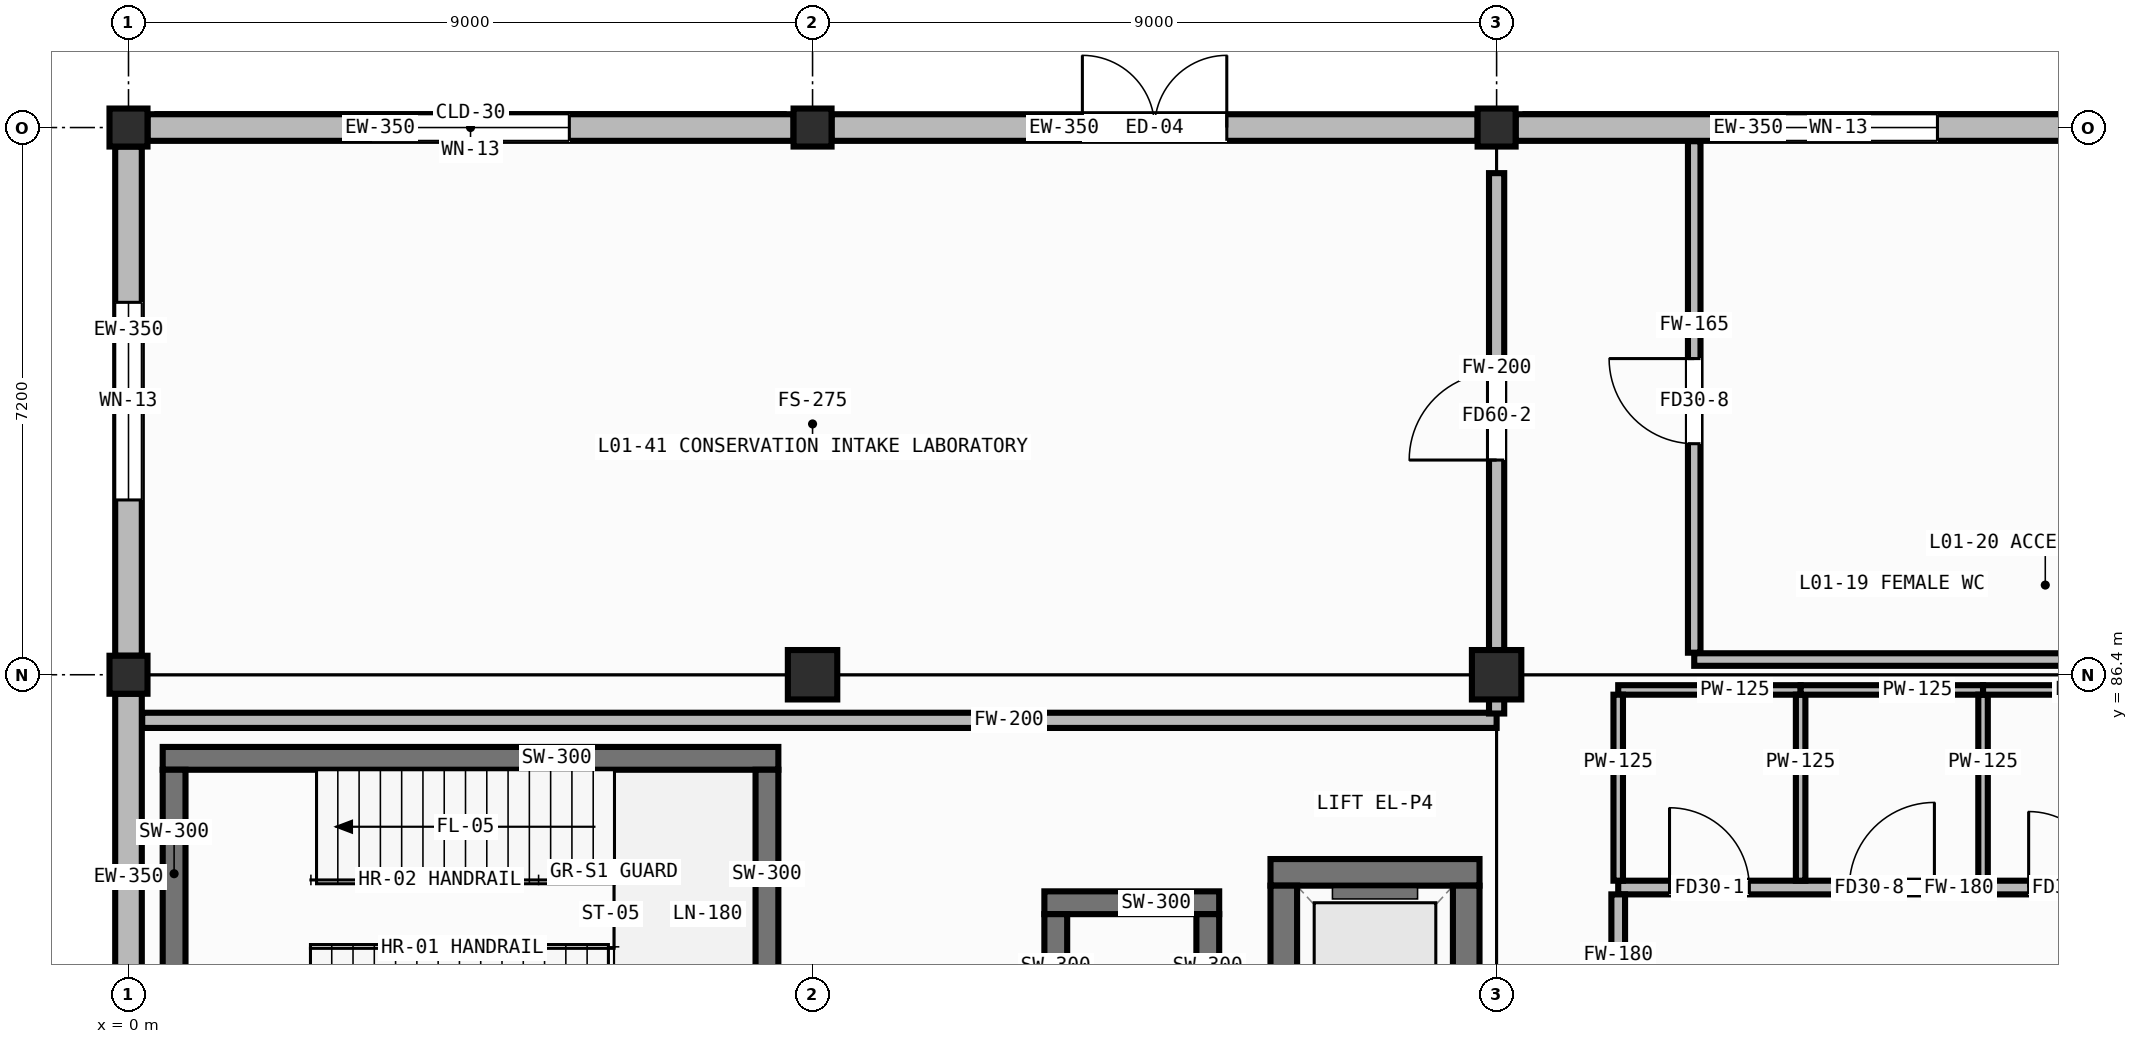
"""IFC4 building model, lengths in metres.
Left out: names, types, materials, properties, quantities, classifications, styles, units other than length and angle.
Written with IfcOpenShell. Run it as: python <this file> out.ifc"""

import sys

from ifc_helpers import new_model, si_unit, direction, frame, frame_2d, origin, origin_2d, place, context, subcontext, project, spatial, rectangle, hollow_rectangle, extrude, element, fill, save


model = new_model("IFC4")
c1 = context("Model", 3, precision=1e-05, world=origin(), true_north=direction((0.0, 1.0)))
c2 = subcontext(c1, "Body", "Model", "MODEL_VIEW")
j1 = project(units=[si_unit("LENGTHUNIT", "METRE"), si_unit("PLANEANGLEUNIT", "RADIAN")], contexts=[c1])
p1 = place(None, origin())
s1 = spatial("IfcSite", under=j1, at=p1, CompositionType="ELEMENT")
p2 = place(p1, origin())
s2 = spatial("IfcBuilding", under=s1, at=p2, CompositionType="ELEMENT")
p3 = place(p2, origin())
s3 = spatial("IfcBuildingStorey", under=s2, at=p3, CompositionType="ELEMENT", Elevation=0.0)
for number, where, z_axis, x_axis in (
    (1, (0.0, 86.4, 0.0), (0.0, 0.0, 1.0), (1.0, 0.0, 0.0)),
    (2, (0.0, 93.6, 0.0), (0.0, 0.0, 1.0), (1.0, 0.0, 0.0)),
):
    element("IfcColumn", number, at=place(p3, frame(where, z_axis=z_axis, x_axis=x_axis)), inside=s3, PredefinedType="COLUMN", context=c2, shape_type="SweptSolid", body=[
        extrude(hollow_rectangle(XDim=0.5, YDim=0.5, WallThickness=0.022, at=origin_2d()), origin(), (0.0, 0.0, 1.0), 4.8),
    ])
p4 = place(p3, frame((9.0, 86.4, 0.0), z_axis=(0.0, 0.0, 1.0), x_axis=(1.0, 0.0, 0.0)))
e3 = element("IfcColumn", 3, at=p4, inside=s3, PredefinedType="COLUMN", context=c2, shape_type="SweptSolid", body=[
    extrude(hollow_rectangle(XDim=0.65, YDim=0.65, WallThickness=0.025, at=origin_2d()), origin(), (0.0, 0.0, 1.0), 4.8),
])
p5 = place(p3, frame((9.0, 93.6, 0.0), z_axis=(0.0, 0.0, 1.0), x_axis=(1.0, 0.0, 0.0)))
e4 = element("IfcColumn", 4, at=p5, inside=s3, PredefinedType="COLUMN", context=c2, shape_type="SweptSolid", body=[
    extrude(hollow_rectangle(XDim=0.5, YDim=0.5, WallThickness=0.022, at=origin_2d()), origin(), (0.0, 0.0, 1.0), 4.8),
])
p6 = place(p3, frame((18.0, 86.4, 0.0), z_axis=(0.0, 0.0, 1.0), x_axis=(1.0, 0.0, 0.0)))
e5 = element("IfcColumn", 5, at=p6, inside=s3, PredefinedType="COLUMN", context=c2, shape_type="SweptSolid", body=[
    extrude(hollow_rectangle(XDim=0.65, YDim=0.65, WallThickness=0.025, at=origin_2d()), origin(), (0.0, 0.0, 1.0), 4.8),
])
p7 = place(p3, frame((18.0, 93.6, 0.0), z_axis=(0.0, 0.0, 1.0), x_axis=(1.0, 0.0, 0.0)))
e6 = element("IfcColumn", 6, at=p7, inside=s3, PredefinedType="COLUMN", context=c2, shape_type="SweptSolid", body=[
    extrude(hollow_rectangle(XDim=0.5, YDim=0.5, WallThickness=0.022, at=origin_2d()), origin(), (0.0, 0.0, 1.0), 4.8),
])
p8 = place(p3, frame((8.75, 93.6, 0.0), z_axis=(0.0, 0.0, 1.0), x_axis=(-1.0, 0.0, 0.0)))
e7 = element("IfcWall", 7, at=p8, inside=s3, PredefinedType="STANDARD", context=c2, shape_type="SweptSolid", body=[
    extrude(rectangle(XDim=8.5, YDim=0.35, at=frame_2d((4.25, 0.0))), origin(), (0.0, 0.0, 1.0), 4.055),
])
p9 = place(p8, frame((2.95, 0.0, 0.85)))
e8 = element("IfcOpeningElement", 8, at=p9, cuts=e7, PredefinedType="OPENING", context=c2, shape_type="SweptSolid", body=[
    extrude(rectangle(XDim=2.6, YDim=1.6, at=frame_2d((1.3, 0.8))), frame((0.0, 0.187, 0.0), z_axis=(0.0, -1.0, 0.0), x_axis=(1.0, 0.0, 0.0)), (0.0, 0.0, 1.0), 0.374),
])
p10 = place(p3, frame((17.75, 93.6, 0.0), z_axis=(0.0, 0.0, 1.0), x_axis=(-1.0, 0.0, 0.0)))
e9 = element("IfcWall", 9, at=p10, inside=s3, PredefinedType="STANDARD", context=c2, shape_type="SweptSolid", body=[
    extrude(rectangle(XDim=8.5, YDim=0.35, at=frame_2d((4.25, 0.0))), origin(), (0.0, 0.0, 1.0), 4.055),
])
p11 = place(p10, frame((3.3, 0.0, 0.0)))
e10 = element("IfcOpeningElement", 10, at=p11, cuts=e9, PredefinedType="OPENING", context=c2, shape_type="SweptSolid", body=[
    extrude(rectangle(XDim=1.9, YDim=2.4, at=frame_2d((0.95, 1.2))), frame((0.0, 0.187, 0.0), z_axis=(0.0, -1.0, 0.0), x_axis=(1.0, 0.0, 0.0)), (0.0, 0.0, 1.0), 0.374),
])
p12 = place(p3, frame((26.75, 93.6, 0.0), z_axis=(0.0, 0.0, 1.0), x_axis=(-1.0, 0.0, 0.0)))
e11 = element("IfcWall", 11, at=p12, inside=s3, PredefinedType="STANDARD", context=c2, shape_type="SweptSolid", body=[
    extrude(rectangle(XDim=8.5, YDim=0.35, at=frame_2d((4.25, 0.0))), origin(), (0.0, 0.0, 1.0), 4.055),
])
p13 = place(p12, frame((2.95, 0.0, 0.85)))
e12 = element("IfcOpeningElement", 12, at=p13, cuts=e11, PredefinedType="OPENING", context=c2, shape_type="SweptSolid", body=[
    extrude(rectangle(XDim=2.6, YDim=1.6, at=frame_2d((1.3, 0.8))), frame((0.0, 0.187, 0.0), z_axis=(0.0, -1.0, 0.0), x_axis=(1.0, 0.0, 0.0)), (0.0, 0.0, 1.0), 0.374),
])
p14 = place(p3, frame((0.0, 79.45, 0.0), z_axis=(0.0, 0.0, 1.0), x_axis=(0.0, 1.0, 0.0)))
e13 = element("IfcWall", 13, at=p14, inside=s3, PredefinedType="STANDARD", context=c2, shape_type="SweptSolid", body=[
    extrude(rectangle(XDim=6.7, YDim=0.35, at=frame_2d((3.35, 0.0))), origin(), (0.0, 0.0, 1.0), 4.055),
])
p15 = place(p3, frame((0.0, 86.65, 0.0), z_axis=(0.0, 0.0, 1.0), x_axis=(0.0, 1.0, 0.0)))
e14 = element("IfcWall", 14, at=p15, inside=s3, PredefinedType="STANDARD", context=c2, shape_type="SweptSolid", body=[
    extrude(rectangle(XDim=6.7, YDim=0.35, at=frame_2d((3.35, 0.0))), origin(), (0.0, 0.0, 1.0), 4.055),
])
p16 = place(p15, frame((2.05, 0.0, 0.85)))
e15 = element("IfcOpeningElement", 15, at=p16, cuts=e14, PredefinedType="OPENING", context=c2, shape_type="SweptSolid", body=[
    extrude(rectangle(XDim=2.6, YDim=1.6, at=frame_2d((1.3, 0.8))), frame((0.0, 0.187, 0.0), z_axis=(0.0, -1.0, 0.0), x_axis=(1.0, 0.0, 0.0)), (0.0, 0.0, 1.0), 0.374),
])
p17 = place(p3, frame((0.45, 85.3, 0.0), z_axis=(0.0, 0.0, 1.0), x_axis=(1.0, 0.0, 0.0)))
e16 = element("IfcWall", 16, at=p17, inside=s3, PredefinedType="SHEAR", context=c2, shape_type="SweptSolid", body=[
    extrude(rectangle(XDim=8.1, YDim=0.3, at=frame_2d((4.05, 0.0))), origin(), (0.0, 0.0, 1.0), 4.555),
])
for number, where, z_axis, x_axis in (
    (17, (0.6, 81.35, 0.0), (0.0, 0.0, 1.0), (0.0, 1.0, 0.0)),
    (18, (8.4, 81.35, 0.0), (0.0, 0.0, 1.0), (0.0, 1.0, 0.0)),
):
    element("IfcWall", number, at=place(p3, frame(where, z_axis=z_axis, x_axis=x_axis)), inside=s3, PredefinedType="SHEAR", context=c2, shape_type="SweptSolid", body=[
        extrude(rectangle(XDim=3.8, YDim=0.3, at=frame_2d((1.9, 0.0))), origin(), (0.0, 0.0, 1.0), 4.555),
    ])
p18 = place(p3, frame((15.025, 83.8, 0.0), z_axis=(0.0, 0.0, 1.0), x_axis=(1.0, 0.0, 0.0)))
e19 = element("IfcWall", 19, at=p18, inside=s3, PredefinedType="SHEAR", context=c2, shape_type="SweptSolid", body=[
    extrude(rectangle(XDim=2.75, YDim=0.35, at=frame_2d((1.375, 0.0))), origin(), (0.0, 0.0, 1.0), 4.555),
])
for number, where, z_axis, x_axis in (
    (20, (15.2, 81.375, 0.0), (0.0, 0.0, 1.0), (0.0, 1.0, 0.0)),
    (21, (17.6, 81.375, 0.0), (0.0, 0.0, 1.0), (0.0, 1.0, 0.0)),
):
    element("IfcWall", number, at=place(p3, frame(where, z_axis=z_axis, x_axis=x_axis)), inside=s3, PredefinedType="SHEAR", context=c2, shape_type="SweptSolid", body=[
        extrude(rectangle(XDim=2.25, YDim=0.35, at=frame_2d((1.125, 0.0))), origin(), (0.0, 0.0, 1.0), 4.555),
    ])
p19 = place(p3, frame((12.05, 83.4, 0.0), z_axis=(0.0, 0.0, 1.0), x_axis=(1.0, 0.0, 0.0)))
e22 = element("IfcWall", 22, at=p19, inside=s3, PredefinedType="SHEAR", context=c2, shape_type="SweptSolid", body=[
    extrude(rectangle(XDim=2.3, YDim=0.3, at=frame_2d((1.15, 0.0))), origin(), (0.0, 0.0, 1.0), 4.555),
])
for number, where, z_axis, x_axis in (
    (23, (12.2, 81.35, 0.0), (0.0, 0.0, 1.0), (0.0, 1.0, 0.0)),
    (24, (14.2, 81.35, 0.0), (0.0, 0.0, 1.0), (0.0, 1.0, 0.0)),
):
    element("IfcWall", number, at=place(p3, frame(where, z_axis=z_axis, x_axis=x_axis)), inside=s3, PredefinedType="SHEAR", context=c2, shape_type="SweptSolid", body=[
        extrude(rectangle(XDim=1.9, YDim=0.3, at=frame_2d((0.95, 0.0))), origin(), (0.0, 0.0, 1.0), 4.555),
    ])
p20 = place(p3, frame((19.6, 83.6, 0.0), z_axis=(0.0, 0.0, 1.0), x_axis=(1.0, 0.0, 0.0)))
e25 = element("IfcWall", 25, at=p20, inside=s3, PredefinedType="PARTITIONING", context=c2, shape_type="SweptSolid", body=[
    extrude(rectangle(XDim=7.0, YDim=0.18, at=frame_2d((3.5, 0.0))), origin(), (0.0, 0.0, 1.0), 4.555),
])
p21 = place(p20, frame((0.675, 0.0, 0.0)))
e26 = element("IfcOpeningElement", 26, at=p21, cuts=e25, PredefinedType="OPENING", context=c2, shape_type="SweptSolid", body=[
    extrude(rectangle(XDim=1.05, YDim=2.1, at=frame_2d((0.525, 1.05))), frame((0.0, 0.102, 0.0), z_axis=(0.0, -1.0, 0.0), x_axis=(1.0, 0.0, 0.0)), (0.0, 0.0, 1.0), 0.204),
])
p22 = place(p20, frame((3.04, 0.0, 0.0)))
e27 = element("IfcOpeningElement", 27, at=p22, cuts=e25, PredefinedType="OPENING", context=c2, shape_type="SweptSolid", body=[
    extrude(rectangle(XDim=1.12, YDim=2.08, at=frame_2d((0.56, 1.04))), frame((0.0, 0.102, 0.0), z_axis=(0.0, -1.0, 0.0), x_axis=(1.0, 0.0, 0.0)), (0.0, 0.0, 1.0), 0.204),
])
p23 = place(p20, frame((5.4, 0.0, 0.0)))
e28 = element("IfcOpeningElement", 28, at=p23, cuts=e25, PredefinedType="OPENING", context=c2, shape_type="SweptSolid", body=[
    extrude(rectangle(XDim=1.0, YDim=2.08, at=frame_2d((0.5, 1.04))), frame((0.0, 0.102, 0.0), z_axis=(0.0, -1.0, 0.0), x_axis=(1.0, 0.0, 0.0)), (0.0, 0.0, 1.0), 0.204),
])
p24 = place(p3, frame((19.6, 81.29, 0.0), z_axis=(0.0, 0.0, 1.0), x_axis=(0.0, 1.0, 0.0)))
e29 = element("IfcWall", 29, at=p24, inside=s3, PredefinedType="PARTITIONING", context=c2, shape_type="SweptSolid", body=[
    extrude(rectangle(XDim=2.22, YDim=0.18, at=frame_2d((1.11, 0.0))), origin(), (0.0, 0.0, 1.0), 4.555),
])
p25 = place(p3, frame((19.6, 86.2, 0.0), z_axis=(0.0, 0.0, 1.0), x_axis=(1.0, 0.0, 0.0)))
e30 = element("IfcWall", 30, at=p25, inside=s3, PredefinedType="PARTITIONING", context=c2, shape_type="SweptSolid", body=[
    extrude(rectangle(XDim=2.4, YDim=0.125, at=frame_2d((1.2, 0.0))), origin(), (0.0, 0.0, 1.0), 3.835),
])
for number, where, z_axis, x_axis in (
    (31, (19.6, 83.69, 0.0), (0.0, 0.0, 1.0), (0.0, 1.0, 0.0)),
    (32, (22.0, 83.69, 0.0), (0.0, 0.0, 1.0), (0.0, 1.0, 0.0)),
):
    element("IfcWall", number, at=place(p3, frame(where, z_axis=z_axis, x_axis=x_axis)), inside=s3, PredefinedType="PARTITIONING", context=c2, shape_type="SweptSolid", body=[
        extrude(rectangle(XDim=2.448, YDim=0.125, at=frame_2d((1.224, 0.0))), origin(), (0.0, 0.0, 1.0), 4.555),
    ])
p26 = place(p3, frame((22.0, 86.2, 0.0), z_axis=(0.0, 0.0, 1.0), x_axis=(1.0, 0.0, 0.0)))
e33 = element("IfcWall", 33, at=p26, inside=s3, PredefinedType="PARTITIONING", context=c2, shape_type="SweptSolid", body=[
    extrude(rectangle(XDim=2.4, YDim=0.125, at=frame_2d((1.2, 0.0))), origin(), (0.0, 0.0, 1.0), 3.835),
])
p27 = place(p3, frame((24.4, 83.69, 0.0), z_axis=(0.0, 0.0, 1.0), x_axis=(0.0, 1.0, 0.0)))
e34 = element("IfcWall", 34, at=p27, inside=s3, PredefinedType="PARTITIONING", context=c2, shape_type="SweptSolid", body=[
    extrude(rectangle(XDim=2.448, YDim=0.125, at=frame_2d((1.224, 0.0))), origin(), (0.0, 0.0, 1.0), 4.555),
])
p28 = place(p3, frame((24.4, 86.2, 0.0), z_axis=(0.0, 0.0, 1.0), x_axis=(1.0, 0.0, 0.0)))
e35 = element("IfcWall", 35, at=p28, inside=s3, PredefinedType="PARTITIONING", context=c2, shape_type="SweptSolid", body=[
    extrude(rectangle(XDim=2.2, YDim=0.125, at=frame_2d((1.1, 0.0))), origin(), (0.0, 0.0, 1.0), 3.835),
])
p29 = place(p3, frame((0.18, 85.8, 0.0), z_axis=(0.0, 0.0, 1.0), x_axis=(1.0, 0.0, 0.0)))
e36 = element("IfcWall", 36, at=p29, inside=s3, PredefinedType="PARTITIONING", context=c2, shape_type="SweptSolid", body=[
    extrude(rectangle(XDim=17.82, YDim=0.2, at=frame_2d((8.91, 0.0))), origin(), (0.0, 0.0, 1.0), 4.555),
])
p30 = place(p3, frame((18.0, 85.89, 0.0), z_axis=(0.0, 0.0, 1.0), x_axis=(0.0, 1.0, 0.0)))
e37 = element("IfcWall", 37, at=p30, inside=s3, PredefinedType="PARTITIONING", context=c2, shape_type="SweptSolid", body=[
    extrude(rectangle(XDim=7.11, YDim=0.2, at=frame_2d((3.555, 0.0))), origin(), (0.0, 0.0, 1.0), 3.835),
])
p31 = place(p30, frame((3.335, 0.0, 0.0)))
e38 = element("IfcOpeningElement", 38, at=p31, cuts=e37, PredefinedType="OPENING", context=c2, shape_type="SweptSolid", body=[
    extrude(rectangle(XDim=1.15, YDim=2.1, at=frame_2d((0.575, 1.05))), frame((0.0, 0.112, 0.0), z_axis=(0.0, -1.0, 0.0), x_axis=(1.0, 0.0, 0.0)), (0.0, 0.0, 1.0), 0.224),
])
p32 = place(p3, frame((20.6, 86.6, 0.0), z_axis=(0.0, 0.0, 1.0), x_axis=(1.0, 0.0, 0.0)))
e39 = element("IfcWall", 39, at=p32, inside=s3, PredefinedType="PARTITIONING", context=c2, shape_type="SweptSolid", body=[
    extrude(rectangle(XDim=14.945, YDim=0.165, at=frame_2d((7.472, 0.0))), origin(), (0.0, 0.0, 1.0), 3.835),
])
p33 = place(p3, frame((20.6, 86.69, 0.0), z_axis=(0.0, 0.0, 1.0), x_axis=(0.0, 1.0, 0.0)))
e40 = element("IfcWall", 40, at=p33, inside=s3, PredefinedType="PARTITIONING", context=c2, shape_type="SweptSolid", body=[
    extrude(rectangle(XDim=6.73, YDim=0.165, at=frame_2d((3.365, 0.0))), origin(), (0.0, 0.0, 1.0), 4.555),
])
p34 = place(p33, frame((2.75, 0.0, 0.0)))
e41 = element("IfcOpeningElement", 41, at=p34, cuts=e40, PredefinedType="OPENING", context=c2, shape_type="SweptSolid", body=[
    extrude(rectangle(XDim=1.12, YDim=2.08, at=frame_2d((0.56, 1.04))), frame((0.0, 0.094, 0.0), z_axis=(0.0, -1.0, 0.0), x_axis=(1.0, 0.0, 0.0)), (0.0, 0.0, 1.0), 0.189),
])
p35 = place(p9, origin())
e42 = element("IfcWindow", 42, at=p35, inside=s3, PartitioningType="DOUBLE_PANEL_VERTICAL", PredefinedType="WINDOW", context=c2, shape_type="SweptSolid", body=[
    extrude(rectangle(XDim=2.6, YDim=1.6, at=frame_2d((1.3, 0.8))), frame((0.0, 0.03, 0.0), z_axis=(0.0, -1.0, 0.0), x_axis=(1.0, 0.0, 0.0)), (0.0, 0.0, 1.0), 0.06),
])
fill(e8, e42)
p36 = place(p11, frame((1.9, 0.0, 0.0), z_axis=(0.0, 0.0, 1.0), x_axis=(-1.0, 0.0, 0.0)))
e43 = element("IfcDoor", 43, at=p36, inside=s3, OperationType="DOUBLE_DOOR_SINGLE_SWING", PredefinedType="DOOR", context=c2, shape_type="SweptSolid", body=[
    extrude(rectangle(XDim=1.9, YDim=2.4, at=frame_2d((0.95, 1.2))), frame((0.0, 0.025, 0.0), z_axis=(0.0, -1.0, 0.0), x_axis=(1.0, 0.0, 0.0)), (0.0, 0.0, 1.0), 0.05),
])
fill(e10, e43)
p37 = place(p13, origin())
e44 = element("IfcWindow", 44, at=p37, inside=s3, PartitioningType="DOUBLE_PANEL_VERTICAL", PredefinedType="WINDOW", context=c2, shape_type="SweptSolid", body=[
    extrude(rectangle(XDim=2.6, YDim=1.6, at=frame_2d((1.3, 0.8))), frame((0.0, 0.03, 0.0), z_axis=(0.0, -1.0, 0.0), x_axis=(1.0, 0.0, 0.0)), (0.0, 0.0, 1.0), 0.06),
])
fill(e12, e44)
p38 = place(p16, origin())
e45 = element("IfcWindow", 45, at=p38, inside=s3, PartitioningType="DOUBLE_PANEL_VERTICAL", PredefinedType="WINDOW", context=c2, shape_type="SweptSolid", body=[
    extrude(rectangle(XDim=2.6, YDim=1.6, at=frame_2d((1.3, 0.8))), frame((0.0, 0.03, 0.0), z_axis=(0.0, -1.0, 0.0), x_axis=(1.0, 0.0, 0.0)), (0.0, 0.0, 1.0), 0.06),
])
fill(e15, e45)
p39 = place(p21, origin())
e46 = element("IfcDoor", 46, at=p39, inside=s3, OperationType="SINGLE_SWING_LEFT", PredefinedType="DOOR", context=c2, shape_type="SweptSolid", body=[
    extrude(rectangle(XDim=1.05, YDim=2.1, at=frame_2d((0.525, 1.05))), frame((0.0, 0.025, 0.0), z_axis=(0.0, -1.0, 0.0), x_axis=(1.0, 0.0, 0.0)), (0.0, 0.0, 1.0), 0.05),
])
fill(e26, e46)
p40 = place(p22, origin())
e47 = element("IfcDoor", 47, at=p40, inside=s3, OperationType="SINGLE_SWING_RIGHT", PredefinedType="DOOR", context=c2, shape_type="SweptSolid", body=[
    extrude(rectangle(XDim=1.12, YDim=2.08, at=frame_2d((0.56, 1.04))), frame((0.0, 0.025, 0.0), z_axis=(0.0, -1.0, 0.0), x_axis=(1.0, 0.0, 0.0)), (0.0, 0.0, 1.0), 0.05),
])
fill(e27, e47)
p41 = place(p23, origin())
e48 = element("IfcDoor", 48, at=p41, inside=s3, OperationType="SINGLE_SWING_LEFT", PredefinedType="DOOR", context=c2, shape_type="SweptSolid", body=[
    extrude(rectangle(XDim=1.0, YDim=2.08, at=frame_2d((0.5, 1.04))), frame((0.0, 0.025, 0.0), z_axis=(0.0, -1.0, 0.0), x_axis=(1.0, 0.0, 0.0)), (0.0, 0.0, 1.0), 0.05),
])
fill(e28, e48)
p42 = place(p31, origin())
e49 = element("IfcDoor", 49, at=p42, inside=s3, OperationType="SINGLE_SWING_LEFT", PredefinedType="DOOR", context=c2, shape_type="SweptSolid", body=[
    extrude(rectangle(XDim=1.15, YDim=2.1, at=frame_2d((0.575, 1.05))), frame((0.0, 0.025, 0.0), z_axis=(0.0, -1.0, 0.0), x_axis=(1.0, 0.0, 0.0)), (0.0, 0.0, 1.0), 0.05),
])
fill(e38, e49)
p43 = place(p34, origin())
e50 = element("IfcDoor", 50, at=p43, inside=s3, OperationType="SINGLE_SWING_RIGHT", PredefinedType="DOOR", context=c2, shape_type="SweptSolid", body=[
    extrude(rectangle(XDim=1.12, YDim=2.08, at=frame_2d((0.56, 1.04))), frame((0.0, 0.025, 0.0), z_axis=(0.0, -1.0, 0.0), x_axis=(1.0, 0.0, 0.0)), (0.0, 0.0, 1.0), 0.05),
])
fill(e41, e50)
save(model, sys.argv[1])
